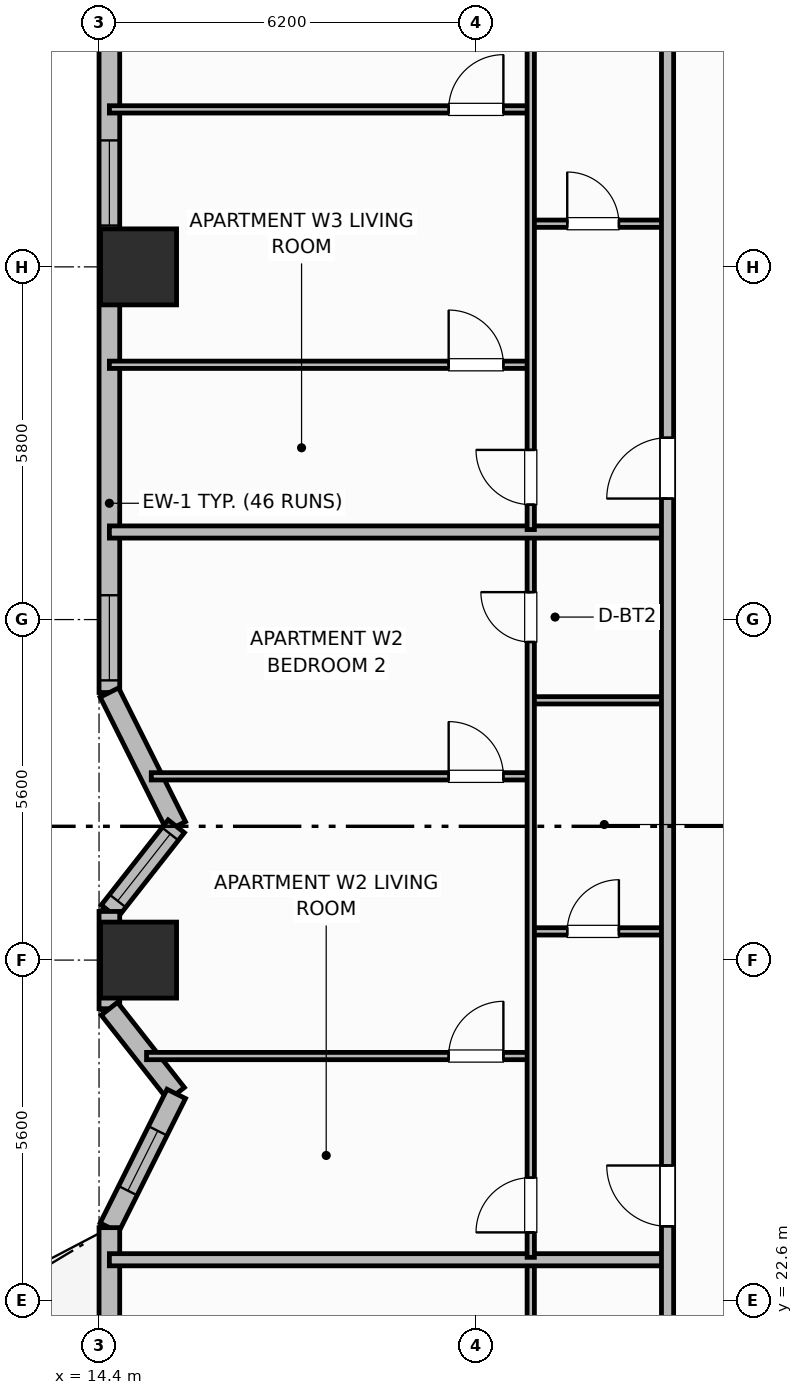
"""IFC4 building model, lengths in metres.
Left out: names, types, materials, properties, quantities, classifications, styles, units other than length and angle.
Written with IfcOpenShell. Run it as: python <this file> out.ifc"""

import sys

from ifc_helpers import new_model, si_unit, direction, frame, frame_2d, origin, origin_2d, place, context, subcontext, project, spatial, rectangle, extrude, element, fill, save


model = new_model("IFC4")
c1 = context("Model", 3, precision=1e-05, world=origin(), true_north=direction((0.0, 1.0)))
c2 = subcontext(c1, "Body", "Model", "MODEL_VIEW")
j1 = project(units=[si_unit("LENGTHUNIT", "METRE"), si_unit("PLANEANGLEUNIT", "RADIAN")], contexts=[c1])
p1 = place(None, origin())
s1 = spatial("IfcSite", under=j1, at=p1, CompositionType="ELEMENT")
p2 = place(p1, origin())
s2 = spatial("IfcBuilding", under=s1, at=p2, CompositionType="ELEMENT")
p3 = place(p2, frame((0.0, 0.0, 73.2)))
s3 = spatial("IfcBuildingStorey", under=s2, at=p3, CompositionType="ELEMENT", Elevation=73.2)
for number, where, z_axis, x_axis in (
    (1, (15.05, 28.2, 0.0), (0.0, 0.0, 1.0), (1.0, 0.0, 0.0)),
    (2, (15.05, 39.6, 0.0), (0.0, 0.0, 1.0), (1.0, 0.0, 0.0)),
):
    element("IfcColumn", number, at=place(p3, frame(where, z_axis=z_axis, x_axis=x_axis)), inside=s3, PredefinedType="COLUMN", context=c2, shape_type="SweptSolid", body=[
        extrude(rectangle(XDim=1.25, YDim=1.25, at=origin_2d()), origin(), (0.0, 0.0, 1.0), 3.7),
    ])
p4 = place(p3, frame((14.57, 47.4, 0.0), z_axis=(0.0, 0.0, 1.0), x_axis=(0.0, -1.0, 0.0)))
e3 = element("IfcWall", 3, at=p4, inside=s3, PredefinedType="SOLIDWALL", context=c2, shape_type="SweptSolid", body=[
    extrude(rectangle(XDim=14.8, YDim=0.34, at=frame_2d((7.4, 0.0))), origin(), (0.0, 0.0, 1.0), 2.66),
])
p5 = place(p4, frame((2.72, 0.0, 0.65)))
e4 = element("IfcOpeningElement", 4, at=p5, cuts=e3, PredefinedType="OPENING", context=c2, shape_type="SweptSolid", body=[
    extrude(rectangle(XDim=1.4, YDim=1.85, at=frame_2d((0.7, 0.925))), frame((0.0, 0.18, 0.0), z_axis=(0.0, -1.0, 0.0), x_axis=(1.0, 0.0, 0.0)), (0.0, 0.0, 1.0), 0.36),
])
p6 = place(p4, frame((5.72, 0.0, 0.65)))
e5 = element("IfcOpeningElement", 5, at=p6, cuts=e3, PredefinedType="OPENING", context=c2, shape_type="SweptSolid", body=[
    extrude(rectangle(XDim=1.4, YDim=1.85, at=frame_2d((0.7, 0.925))), frame((0.0, 0.18, 0.0), z_axis=(0.0, -1.0, 0.0), x_axis=(1.0, 0.0, 0.0)), (0.0, 0.0, 1.0), 0.36),
])
p7 = place(p4, frame((13.2, 0.0, 0.65)))
e6 = element("IfcOpeningElement", 6, at=p7, cuts=e3, PredefinedType="OPENING", context=c2, shape_type="SweptSolid", body=[
    extrude(rectangle(XDim=1.4, YDim=1.85, at=frame_2d((0.7, 0.925))), frame((0.0, 0.18, 0.0), z_axis=(0.0, -1.0, 0.0), x_axis=(1.0, 0.0, 0.0)), (0.0, 0.0, 1.0), 0.36),
])
p8 = place(p3, frame((14.57, 32.6, 0.0), z_axis=(0.0, 0.0, 1.0), x_axis=(0.44713419144, -0.894466888625, 0.0)))
e7 = element("IfcWall", 7, at=p8, inside=s3, PredefinedType="SOLIDWALL", context=c2, shape_type="SweptSolid", body=[
    extrude(rectangle(XDim=2.46, YDim=0.34, at=frame_2d((1.23, 0.0))), origin(), (0.0, 0.0, 1.0), 2.66),
])
p9 = place(p3, frame((15.67, 30.4, 0.0), z_axis=(0.0, 0.0, 1.0), x_axis=(-0.617797325735, -0.786337373088, 0.0)))
e8 = element("IfcWall", 8, at=p9, inside=s3, PredefinedType="SOLIDWALL", context=c2, shape_type="SweptSolid", body=[
    extrude(rectangle(XDim=1.78, YDim=0.34, at=frame_2d((0.89, 0.0))), origin(), (0.0, 0.0, 1.0), 2.66),
])
p10 = place(p9, frame((0.16, 0.0, 0.65)))
e9 = element("IfcOpeningElement", 9, at=p10, cuts=e8, PredefinedType="OPENING", context=c2, shape_type="SweptSolid", body=[
    extrude(rectangle(XDim=1.4, YDim=1.85, at=frame_2d((0.7, 0.925))), frame((0.0, 0.18, 0.0), z_axis=(0.0, -1.0, 0.0), x_axis=(1.0, 0.0, 0.0)), (0.0, 0.0, 1.0), 0.36),
])
p11 = place(p3, frame((14.57, 29.0, 0.0), z_axis=(0.0, 0.0, 1.0), x_axis=(0.0, -1.0, 0.0)))
e10 = element("IfcWall", 10, at=p11, inside=s3, PredefinedType="SOLIDWALL", context=c2, shape_type="SweptSolid", body=[
    extrude(rectangle(XDim=1.6, YDim=0.34, at=frame_2d((0.8, 0.0))), origin(), (0.0, 0.0, 1.0), 2.66),
])
p12 = place(p3, frame((14.57, 27.4, 0.0), z_axis=(0.0, 0.0, 1.0), x_axis=(0.617797325735, -0.786337373088, 0.0)))
e11 = element("IfcWall", 11, at=p12, inside=s3, PredefinedType="SOLIDWALL", context=c2, shape_type="SweptSolid", body=[
    extrude(rectangle(XDim=1.78, YDim=0.34, at=frame_2d((0.89, 0.0))), origin(), (0.0, 0.0, 1.0), 2.66),
])
p13 = place(p3, frame((15.67, 26.0, 0.0), z_axis=(0.0, 0.0, 1.0), x_axis=(-0.447173890385, -0.894447042456, 0.0)))
e12 = element("IfcWall", 12, at=p13, inside=s3, PredefinedType="SOLIDWALL", context=c2, shape_type="SweptSolid", body=[
    extrude(rectangle(XDim=2.459, YDim=0.34, at=frame_2d((1.23, 0.0))), origin(), (0.0, 0.0, 1.0), 2.66),
])
p14 = place(p13, frame((0.68, 0.0, 0.85)))
e13 = element("IfcOpeningElement", 13, at=p14, cuts=e12, PredefinedType="OPENING", context=c2, shape_type="SweptSolid", body=[
    extrude(rectangle(XDim=1.1, YDim=1.65, at=frame_2d((0.55, 0.825))), frame((0.0, 0.18, 0.0), z_axis=(0.0, -1.0, 0.0), x_axis=(1.0, 0.0, 0.0)), (0.0, 0.0, 1.0), 0.36),
])
p15 = place(p3, frame((14.57, 23.8, 0.0), z_axis=(0.0, 0.0, 1.0), x_axis=(0.0, -1.0, 0.0)))
e14 = element("IfcWall", 14, at=p15, inside=s3, PredefinedType="SOLIDWALL", context=c2, shape_type="SweptSolid", body=[
    extrude(rectangle(XDim=14.8, YDim=0.34, at=frame_2d((7.4, 0.0))), origin(), (0.0, 0.0, 1.0), 2.66),
])
p16 = place(p15, frame((1.7, 0.0, 0.0)))
e15 = element("IfcOpeningElement", 15, at=p16, cuts=e14, PredefinedType="OPENING", context=c2, shape_type="SweptSolid", body=[
    extrude(rectangle(XDim=1.6, YDim=2.1, at=frame_2d((0.8, 1.05))), frame((0.0, 0.18, 0.0), z_axis=(0.0, -1.0, 0.0), x_axis=(1.0, 0.0, 0.0)), (0.0, 0.0, 1.0), 0.36),
])
p17 = place(p15, frame((5.2, 0.0, 0.85)))
e16 = element("IfcOpeningElement", 16, at=p17, cuts=e14, PredefinedType="OPENING", context=c2, shape_type="SweptSolid", body=[
    extrude(rectangle(XDim=1.1, YDim=1.65, at=frame_2d((0.55, 0.825))), frame((0.0, 0.18, 0.0), z_axis=(0.0, -1.0, 0.0), x_axis=(1.0, 0.0, 0.0)), (0.0, 0.0, 1.0), 0.36),
])
p18 = place(p15, frame((9.55, 0.0, 0.89)))
e17 = element("IfcOpeningElement", 17, at=p18, cuts=e14, PredefinedType="OPENING", context=c2, shape_type="SweptSolid", body=[
    extrude(rectangle(XDim=1.1, YDim=1.65, at=frame_2d((0.55, 0.825))), frame((0.0, 0.18, 0.0), z_axis=(0.0, -1.0, 0.0), x_axis=(1.0, 0.0, 0.0)), (0.0, 0.0, 1.0), 0.36),
])
p19 = place(p3, frame((21.5, 10.64, 0.0), z_axis=(0.0, 0.0, 1.0), x_axis=(0.0, 1.0, 0.0)))
e18 = element("IfcWall", 18, at=p19, inside=s3, PredefinedType="PARTITIONING", context=c2, shape_type="SweptSolid", body=[
    extrude(rectangle(XDim=12.592, YDim=0.12, at=frame_2d((6.296, 0.0))), origin(), (0.0, 0.0, 1.0), 2.49),
])
p20 = place(p19, frame((0.41, 0.0, 0.0)))
e19 = element("IfcOpeningElement", 19, at=p20, cuts=e18, PredefinedType="OPENING", context=c2, shape_type="SweptSolid", body=[
    extrude(rectangle(XDim=0.9, YDim=2.1, at=frame_2d((0.45, 1.05))), frame((0.0, 0.07, 0.0), z_axis=(0.0, -1.0, 0.0), x_axis=(1.0, 0.0, 0.0)), (0.0, 0.0, 1.0), 0.14),
])
p21 = place(p19, frame((10.471, 0.0, 0.0)))
e20 = element("IfcOpeningElement", 20, at=p21, cuts=e18, PredefinedType="OPENING", context=c2, shape_type="SweptSolid", body=[
    extrude(rectangle(XDim=0.82, YDim=2.08, at=frame_2d((0.41, 1.04))), frame((0.0, 0.07, 0.0), z_axis=(0.0, -1.0, 0.0), x_axis=(1.0, 0.0, 0.0)), (0.0, 0.0, 1.0), 0.14),
])
p22 = place(p3, frame((14.57, 23.272, 0.0), z_axis=(0.0, 0.0, 1.0), x_axis=(1.0, 0.0, 0.0)))
e21 = element("IfcWall", 21, at=p22, inside=s3, PredefinedType="PARTITIONING", context=c2, shape_type="SweptSolid", body=[
    extrude(rectangle(XDim=9.18, YDim=0.2, at=frame_2d((4.59, 0.0))), origin(), (0.0, 0.0, 1.0), 2.49),
])
p23 = place(p3, frame((21.5, 28.672, 0.0), z_axis=(0.0, 0.0, 1.0), x_axis=(1.0, 0.0, 0.0)))
e22 = element("IfcWall", 22, at=p23, inside=s3, PredefinedType="PARTITIONING", context=c2, shape_type="SweptSolid", body=[
    extrude(rectangle(XDim=2.25, YDim=0.12, at=frame_2d((1.125, 0.0))), origin(), (0.0, 0.0, 1.0), 2.49),
])
p24 = place(p23, frame((0.6, 0.0, 0.0)))
e23 = element("IfcOpeningElement", 23, at=p24, cuts=e22, PredefinedType="OPENING", context=c2, shape_type="SweptSolid", body=[
    extrude(rectangle(XDim=0.85, YDim=2.1, at=frame_2d((0.425, 1.05))), frame((0.0, 0.07, 0.0), z_axis=(0.0, -1.0, 0.0), x_axis=(1.0, 0.0, 0.0)), (0.0, 0.0, 1.0), 0.14),
])
p25 = place(p3, frame((21.5, 32.472, 0.0), z_axis=(0.0, 0.0, 1.0), x_axis=(1.0, 0.0, 0.0)))
e24 = element("IfcWall", 24, at=p25, inside=s3, PredefinedType="PARTITIONING", context=c2, shape_type="SweptSolid", body=[
    extrude(rectangle(XDim=2.25, YDim=0.12, at=frame_2d((1.125, 0.0))), origin(), (0.0, 0.0, 1.0), 2.49),
])
p26 = place(p3, frame((15.181, 26.622, 0.0), z_axis=(0.0, 0.0, 1.0), x_axis=(1.0, 0.0, 0.0)))
e25 = element("IfcWall", 25, at=p26, inside=s3, PredefinedType="PARTITIONING", context=c2, shape_type="SweptSolid", body=[
    extrude(rectangle(XDim=6.319, YDim=0.12, at=frame_2d((3.159, 0.0))), origin(), (0.0, 0.0, 1.0), 2.49),
])
p27 = place(p26, frame((4.969, 0.0, 0.0)))
e26 = element("IfcOpeningElement", 26, at=p27, cuts=e25, PredefinedType="OPENING", context=c2, shape_type="SweptSolid", body=[
    extrude(rectangle(XDim=0.9, YDim=2.1, at=frame_2d((0.45, 1.05))), frame((0.0, 0.07, 0.0), z_axis=(0.0, -1.0, 0.0), x_axis=(1.0, 0.0, 0.0)), (0.0, 0.0, 1.0), 0.14),
])
p28 = place(p3, frame((15.259, 31.222, 0.0), z_axis=(0.0, 0.0, 1.0), x_axis=(1.0, 0.0, 0.0)))
e27 = element("IfcWall", 27, at=p28, inside=s3, PredefinedType="PARTITIONING", context=c2, shape_type="SweptSolid", body=[
    extrude(rectangle(XDim=6.241, YDim=0.12, at=frame_2d((3.121, 0.0))), origin(), (0.0, 0.0, 1.0), 2.49),
])
p29 = place(p28, frame((4.891, 0.0, 0.0)))
e28 = element("IfcOpeningElement", 28, at=p29, cuts=e27, PredefinedType="OPENING", context=c2, shape_type="SweptSolid", body=[
    extrude(rectangle(XDim=0.9, YDim=2.1, at=frame_2d((0.45, 1.05))), frame((0.0, 0.07, 0.0), z_axis=(0.0, -1.0, 0.0), x_axis=(1.0, 0.0, 0.0)), (0.0, 0.0, 1.0), 0.14),
])
p30 = place(p3, frame((21.5, 23.312, 0.0), z_axis=(0.0, 0.0, 1.0), x_axis=(0.0, 1.0, 0.0)))
e29 = element("IfcWall", 29, at=p30, inside=s3, PredefinedType="PARTITIONING", context=c2, shape_type="SweptSolid", body=[
    extrude(rectangle(XDim=11.888, YDim=0.12, at=frame_2d((5.944, 0.0))), origin(), (0.0, 0.0, 1.0), 2.49),
])
p31 = place(p30, frame((0.41, 0.0, 0.0)))
e30 = element("IfcOpeningElement", 30, at=p31, cuts=e29, PredefinedType="OPENING", context=c2, shape_type="SweptSolid", body=[
    extrude(rectangle(XDim=0.9, YDim=2.1, at=frame_2d((0.45, 1.05))), frame((0.0, 0.07, 0.0), z_axis=(0.0, -1.0, 0.0), x_axis=(1.0, 0.0, 0.0)), (0.0, 0.0, 1.0), 0.14),
])
p32 = place(p30, frame((10.119, 0.0, 0.0)))
e31 = element("IfcOpeningElement", 31, at=p32, cuts=e29, PredefinedType="OPENING", context=c2, shape_type="SweptSolid", body=[
    extrude(rectangle(XDim=0.82, YDim=2.08, at=frame_2d((0.41, 1.04))), frame((0.0, 0.07, 0.0), z_axis=(0.0, -1.0, 0.0), x_axis=(1.0, 0.0, 0.0)), (0.0, 0.0, 1.0), 0.14),
])
p33 = place(p3, frame((14.57, 35.24, 0.0), z_axis=(0.0, 0.0, 1.0), x_axis=(1.0, 0.0, 0.0)))
e32 = element("IfcWall", 32, at=p33, inside=s3, PredefinedType="PARTITIONING", context=c2, shape_type="SweptSolid", body=[
    extrude(rectangle(XDim=9.18, YDim=0.2, at=frame_2d((4.59, 0.0))), origin(), (0.0, 0.0, 1.0), 2.49),
])
p34 = place(p3, frame((21.5, 40.31, 0.0), z_axis=(0.0, 0.0, 1.0), x_axis=(1.0, 0.0, 0.0)))
e33 = element("IfcWall", 33, at=p34, inside=s3, PredefinedType="PARTITIONING", context=c2, shape_type="SweptSolid", body=[
    extrude(rectangle(XDim=2.25, YDim=0.12, at=frame_2d((1.125, 0.0))), origin(), (0.0, 0.0, 1.0), 2.49),
])
p35 = place(p34, frame((0.6, 0.0, 0.0)))
e34 = element("IfcOpeningElement", 34, at=p35, cuts=e33, PredefinedType="OPENING", context=c2, shape_type="SweptSolid", body=[
    extrude(rectangle(XDim=0.85, YDim=2.1, at=frame_2d((0.425, 1.05))), frame((0.0, 0.07, 0.0), z_axis=(0.0, -1.0, 0.0), x_axis=(1.0, 0.0, 0.0)), (0.0, 0.0, 1.0), 0.14),
])
p36 = place(p3, frame((14.57, 37.99, 0.0), z_axis=(0.0, 0.0, 1.0), x_axis=(1.0, 0.0, 0.0)))
e35 = element("IfcWall", 35, at=p36, inside=s3, PredefinedType="PARTITIONING", context=c2, shape_type="SweptSolid", body=[
    extrude(rectangle(XDim=6.93, YDim=0.12, at=frame_2d((3.465, 0.0))), origin(), (0.0, 0.0, 1.0), 2.49),
])
p37 = place(p36, frame((5.58, 0.0, 0.0)))
e36 = element("IfcOpeningElement", 36, at=p37, cuts=e35, PredefinedType="OPENING", context=c2, shape_type="SweptSolid", body=[
    extrude(rectangle(XDim=0.9, YDim=2.1, at=frame_2d((0.45, 1.05))), frame((0.0, 0.07, 0.0), z_axis=(0.0, -1.0, 0.0), x_axis=(1.0, 0.0, 0.0)), (0.0, 0.0, 1.0), 0.14),
])
p38 = place(p3, frame((14.57, 42.19, 0.0), z_axis=(0.0, 0.0, 1.0), x_axis=(1.0, 0.0, 0.0)))
e37 = element("IfcWall", 37, at=p38, inside=s3, PredefinedType="PARTITIONING", context=c2, shape_type="SweptSolid", body=[
    extrude(rectangle(XDim=6.93, YDim=0.12, at=frame_2d((3.465, 0.0))), origin(), (0.0, 0.0, 1.0), 2.49),
])
p39 = place(p38, frame((5.58, 0.0, 0.0)))
e38 = element("IfcOpeningElement", 38, at=p39, cuts=e37, PredefinedType="OPENING", context=c2, shape_type="SweptSolid", body=[
    extrude(rectangle(XDim=0.9, YDim=2.1, at=frame_2d((0.45, 1.05))), frame((0.0, 0.07, 0.0), z_axis=(0.0, -1.0, 0.0), x_axis=(1.0, 0.0, 0.0)), (0.0, 0.0, 1.0), 0.14),
])
p40 = place(p3, frame((21.5, 35.28, 0.0), z_axis=(0.0, 0.0, 1.0), x_axis=(0.0, 1.0, 0.0)))
e39 = element("IfcWall", 39, at=p40, inside=s3, PredefinedType="PARTITIONING", context=c2, shape_type="SweptSolid", body=[
    extrude(rectangle(XDim=10.48, YDim=0.12, at=frame_2d((5.24, 0.0))), origin(), (0.0, 0.0, 1.0), 2.49),
])
p41 = place(p40, frame((0.41, 0.0, 0.0)))
e40 = element("IfcOpeningElement", 40, at=p41, cuts=e39, PredefinedType="OPENING", context=c2, shape_type="SweptSolid", body=[
    extrude(rectangle(XDim=0.9, YDim=2.1, at=frame_2d((0.45, 1.05))), frame((0.0, 0.07, 0.0), z_axis=(0.0, -1.0, 0.0), x_axis=(1.0, 0.0, 0.0)), (0.0, 0.0, 1.0), 0.14),
])
p42 = place(p3, frame((23.75, 10.6, 0.0), z_axis=(0.0, 0.0, 1.0), x_axis=(0.0, 1.0, 0.0)))
e41 = element("IfcWall", 41, at=p42, inside=s3, PredefinedType="PARTITIONING", context=c2, shape_type="SweptSolid", body=[
    extrude(rectangle(XDim=35.2, YDim=0.2, at=frame_2d((17.6, 0.0))), origin(), (0.0, 0.0, 1.0), 2.49),
])
p43 = place(p42, frame((2.65, 0.0, 0.0)))
e42 = element("IfcOpeningElement", 42, at=p43, cuts=e41, PredefinedType="OPENING", context=c2, shape_type="SweptSolid", body=[
    extrude(rectangle(XDim=1.0, YDim=2.15, at=frame_2d((0.5, 1.075))), frame((0.0, 0.11, 0.0), z_axis=(0.0, -1.0, 0.0), x_axis=(1.0, 0.0, 0.0)), (0.0, 0.0, 1.0), 0.22),
])
p44 = place(p42, frame((13.222, 0.0, 0.0)))
e43 = element("IfcOpeningElement", 43, at=p44, cuts=e41, PredefinedType="OPENING", context=c2, shape_type="SweptSolid", body=[
    extrude(rectangle(XDim=1.0, YDim=2.15, at=frame_2d((0.5, 1.075))), frame((0.0, 0.11, 0.0), z_axis=(0.0, -1.0, 0.0), x_axis=(1.0, 0.0, 0.0)), (0.0, 0.0, 1.0), 0.22),
])
p45 = place(p42, frame((25.19, 0.0, 0.0)))
e44 = element("IfcOpeningElement", 44, at=p45, cuts=e41, PredefinedType="OPENING", context=c2, shape_type="SweptSolid", body=[
    extrude(rectangle(XDim=1.0, YDim=2.15, at=frame_2d((0.5, 1.075))), frame((0.0, 0.11, 0.0), z_axis=(0.0, -1.0, 0.0), x_axis=(1.0, 0.0, 0.0)), (0.0, 0.0, 1.0), 0.22),
])
p46 = place(p6, origin())
e45 = element("IfcWindow", 45, at=p46, inside=s3, PartitioningType="SINGLE_PANEL", PredefinedType="WINDOW", context=c2, shape_type="SweptSolid", body=[
    extrude(rectangle(XDim=1.4, YDim=1.85, at=frame_2d((0.7, 0.925))), frame((0.0, 0.03, 0.0), z_axis=(0.0, -1.0, 0.0), x_axis=(1.0, 0.0, 0.0)), (0.0, 0.0, 1.0), 0.06),
])
fill(e5, e45)
p47 = place(p7, origin())
e46 = element("IfcWindow", 46, at=p47, inside=s3, PartitioningType="SINGLE_PANEL", PredefinedType="WINDOW", context=c2, shape_type="SweptSolid", body=[
    extrude(rectangle(XDim=1.4, YDim=1.85, at=frame_2d((0.7, 0.925))), frame((0.0, 0.03, 0.0), z_axis=(0.0, -1.0, 0.0), x_axis=(1.0, 0.0, 0.0)), (0.0, 0.0, 1.0), 0.06),
])
fill(e6, e46)
p48 = place(p10, origin())
e47 = element("IfcWindow", 47, at=p48, inside=s3, PartitioningType="SINGLE_PANEL", PredefinedType="WINDOW", context=c2, shape_type="SweptSolid", body=[
    extrude(rectangle(XDim=1.4, YDim=1.85, at=frame_2d((0.7, 0.925))), frame((0.0, 0.03, 0.0), z_axis=(0.0, -1.0, 0.0), x_axis=(1.0, 0.0, 0.0)), (0.0, 0.0, 1.0), 0.06),
])
fill(e9, e47)
p49 = place(p14, origin())
e48 = element("IfcWindow", 48, at=p49, inside=s3, PartitioningType="SINGLE_PANEL", PredefinedType="WINDOW", context=c2, shape_type="SweptSolid", body=[
    extrude(rectangle(XDim=1.1, YDim=1.65, at=frame_2d((0.55, 0.825))), frame((0.0, 0.03, 0.0), z_axis=(0.0, -1.0, 0.0), x_axis=(1.0, 0.0, 0.0)), (0.0, 0.0, 1.0), 0.06),
])
fill(e13, e48)
p50 = place(p24, origin())
e49 = element("IfcDoor", 49, at=p50, inside=s3, OperationType="SINGLE_SWING_RIGHT", PredefinedType="DOOR", context=c2, shape_type="SweptSolid", body=[
    extrude(rectangle(XDim=0.85, YDim=2.1, at=frame_2d((0.425, 1.05))), frame((0.0, 0.025, 0.0), z_axis=(0.0, -1.0, 0.0), x_axis=(1.0, 0.0, 0.0)), (0.0, 0.0, 1.0), 0.05),
])
fill(e23, e49)
p51 = place(p27, origin())
e50 = element("IfcDoor", 50, at=p51, inside=s3, OperationType="SINGLE_SWING_RIGHT", PredefinedType="DOOR", context=c2, shape_type="SweptSolid", body=[
    extrude(rectangle(XDim=0.9, YDim=2.1, at=frame_2d((0.45, 1.05))), frame((0.0, 0.025, 0.0), z_axis=(0.0, -1.0, 0.0), x_axis=(1.0, 0.0, 0.0)), (0.0, 0.0, 1.0), 0.05),
])
fill(e26, e50)
p52 = place(p29, origin())
e51 = element("IfcDoor", 51, at=p52, inside=s3, OperationType="SINGLE_SWING_LEFT", PredefinedType="DOOR", context=c2, shape_type="SweptSolid", body=[
    extrude(rectangle(XDim=0.9, YDim=2.1, at=frame_2d((0.45, 1.05))), frame((0.0, 0.025, 0.0), z_axis=(0.0, -1.0, 0.0), x_axis=(1.0, 0.0, 0.0)), (0.0, 0.0, 1.0), 0.05),
])
fill(e28, e51)
p53 = place(p31, origin())
e52 = element("IfcDoor", 52, at=p53, inside=s3, OperationType="SINGLE_SWING_LEFT", PredefinedType="DOOR", context=c2, shape_type="SweptSolid", body=[
    extrude(rectangle(XDim=0.9, YDim=2.1, at=frame_2d((0.45, 1.05))), frame((0.0, 0.025, 0.0), z_axis=(0.0, -1.0, 0.0), x_axis=(1.0, 0.0, 0.0)), (0.0, 0.0, 1.0), 0.05),
])
fill(e30, e52)
p54 = place(p32, origin())
e53 = element("IfcDoor", 53, at=p54, inside=s3, OperationType="SINGLE_SWING_RIGHT", PredefinedType="DOOR", context=c2, shape_type="SweptSolid", body=[
    extrude(rectangle(XDim=0.82, YDim=2.08, at=frame_2d((0.41, 1.04))), frame((0.0, 0.025, 0.0), z_axis=(0.0, -1.0, 0.0), x_axis=(1.0, 0.0, 0.0)), (0.0, 0.0, 1.0), 0.05),
])
fill(e31, e53)
p55 = place(p35, origin())
e54 = element("IfcDoor", 54, at=p55, inside=s3, OperationType="SINGLE_SWING_LEFT", PredefinedType="DOOR", context=c2, shape_type="SweptSolid", body=[
    extrude(rectangle(XDim=0.85, YDim=2.1, at=frame_2d((0.425, 1.05))), frame((0.0, 0.025, 0.0), z_axis=(0.0, -1.0, 0.0), x_axis=(1.0, 0.0, 0.0)), (0.0, 0.0, 1.0), 0.05),
])
fill(e34, e54)
p56 = place(p37, origin())
e55 = element("IfcDoor", 55, at=p56, inside=s3, OperationType="SINGLE_SWING_LEFT", PredefinedType="DOOR", context=c2, shape_type="SweptSolid", body=[
    extrude(rectangle(XDim=0.9, YDim=2.1, at=frame_2d((0.45, 1.05))), frame((0.0, 0.025, 0.0), z_axis=(0.0, -1.0, 0.0), x_axis=(1.0, 0.0, 0.0)), (0.0, 0.0, 1.0), 0.05),
])
fill(e36, e55)
p57 = place(p39, origin())
e56 = element("IfcDoor", 56, at=p57, inside=s3, OperationType="SINGLE_SWING_RIGHT", PredefinedType="DOOR", context=c2, shape_type="SweptSolid", body=[
    extrude(rectangle(XDim=0.9, YDim=2.1, at=frame_2d((0.45, 1.05))), frame((0.0, 0.025, 0.0), z_axis=(0.0, -1.0, 0.0), x_axis=(1.0, 0.0, 0.0)), (0.0, 0.0, 1.0), 0.05),
])
fill(e38, e56)
p58 = place(p41, origin())
e57 = element("IfcDoor", 57, at=p58, inside=s3, OperationType="SINGLE_SWING_RIGHT", PredefinedType="DOOR", context=c2, shape_type="SweptSolid", body=[
    extrude(rectangle(XDim=0.9, YDim=2.1, at=frame_2d((0.45, 1.05))), frame((0.0, 0.025, 0.0), z_axis=(0.0, -1.0, 0.0), x_axis=(1.0, 0.0, 0.0)), (0.0, 0.0, 1.0), 0.05),
])
fill(e40, e57)
p59 = place(p44, origin())
e58 = element("IfcDoor", 58, at=p59, inside=s3, OperationType="SINGLE_SWING_RIGHT", PredefinedType="DOOR", context=c2, shape_type="SweptSolid", body=[
    extrude(rectangle(XDim=1.0, YDim=2.15, at=frame_2d((0.5, 1.075))), frame((0.0, 0.025, 0.0), z_axis=(0.0, -1.0, 0.0), x_axis=(1.0, 0.0, 0.0)), (0.0, 0.0, 1.0), 0.05),
])
fill(e43, e58)
p60 = place(p45, origin())
e59 = element("IfcDoor", 59, at=p60, inside=s3, OperationType="SINGLE_SWING_LEFT", PredefinedType="DOOR", context=c2, shape_type="SweptSolid", body=[
    extrude(rectangle(XDim=1.0, YDim=2.15, at=frame_2d((0.5, 1.075))), frame((0.0, 0.025, 0.0), z_axis=(0.0, -1.0, 0.0), x_axis=(1.0, 0.0, 0.0)), (0.0, 0.0, 1.0), 0.05),
])
fill(e44, e59)
save(model, sys.argv[1])
